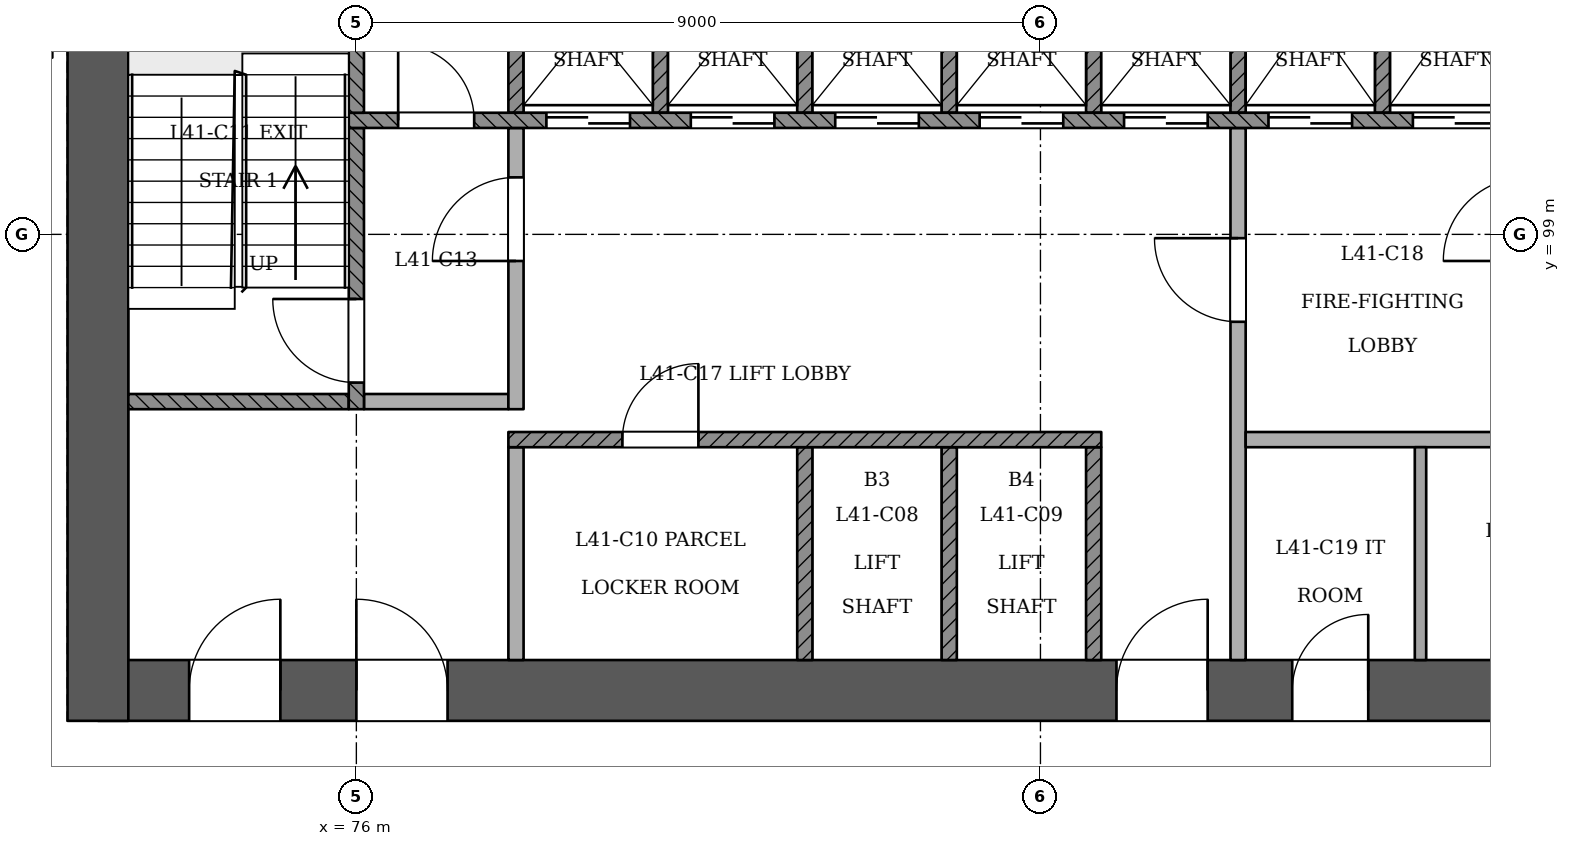
"""IFC4 building model, lengths in metres.
Left out: names, types, materials, properties, quantities, classifications, styles, units other than length and angle.
Written with IfcOpenShell. Run it as: python <this file> out.ifc"""

import sys

from ifc_helpers import new_model, si_unit, direction, frame, frame_2d, origin, place, context, subcontext, project, spatial, rectangle, extrude, element, fill, save


model = new_model("IFC4")
c1 = context("Model", 3, precision=1e-05, world=origin(), true_north=direction((0.0, 1.0)))
c2 = subcontext(c1, "Body", "Model", "MODEL_VIEW")
j1 = project(units=[si_unit("LENGTHUNIT", "METRE"), si_unit("PLANEANGLEUNIT", "RADIAN")], contexts=[c1])
p1 = place(None, origin())
s1 = spatial("IfcSite", under=j1, at=p1, CompositionType="ELEMENT")
p2 = place(p1, origin())
s2 = spatial("IfcBuilding", under=s1, at=p2, CompositionType="ELEMENT")
p3 = place(p2, frame((0.0, 0.0, 160.2)))
s3 = spatial("IfcBuildingStorey", under=s2, at=p3, CompositionType="ELEMENT", Elevation=160.2)
p4 = place(p3, frame((72.6, 93.0, 0.0), z_axis=(0.0, 0.0, 1.0), x_axis=(1.0, 0.0, 0.0)))
e1 = element("IfcWall", 1, at=p4, inside=s3, PredefinedType="SHEAR", context=c2, shape_type="SweptSolid", body=[
    extrude(rectangle(XDim=25.2, YDim=0.8, at=frame_2d((12.6, 0.0))), origin(), (0.0, 0.0, 1.0), 3.6),
])
p5 = place(p4, frame((1.2, 0.0, 0.0)))
e2 = element("IfcOpeningElement", 2, at=p5, cuts=e1, PredefinedType="OPENING", context=c2, shape_type="SweptSolid", body=[
    extrude(rectangle(XDim=1.2, YDim=2.1, at=frame_2d((0.6, 1.05))), frame((0.0, 0.411, 0.0), z_axis=(0.0, -1.0, 0.0), x_axis=(1.0, 0.0, 0.0)), (0.0, 0.0, 1.0), 0.821),
])
p6 = place(p4, frame((3.4, 0.0, 0.0)))
e3 = element("IfcOpeningElement", 3, at=p6, cuts=e1, PredefinedType="OPENING", context=c2, shape_type="SweptSolid", body=[
    extrude(rectangle(XDim=1.2, YDim=2.1, at=frame_2d((0.6, 1.05))), frame((0.0, 0.411, 0.0), z_axis=(0.0, -1.0, 0.0), x_axis=(1.0, 0.0, 0.0)), (0.0, 0.0, 1.0), 0.821),
])
p7 = place(p4, frame((13.4, 0.0, 0.0)))
e4 = element("IfcOpeningElement", 4, at=p7, cuts=e1, PredefinedType="OPENING", context=c2, shape_type="SweptSolid", body=[
    extrude(rectangle(XDim=1.2, YDim=2.1, at=frame_2d((0.6, 1.05))), frame((0.0, 0.411, 0.0), z_axis=(0.0, -1.0, 0.0), x_axis=(1.0, 0.0, 0.0)), (0.0, 0.0, 1.0), 0.821),
])
p8 = place(p4, frame((15.712, 0.0, 0.0)))
e5 = element("IfcOpeningElement", 5, at=p8, cuts=e1, PredefinedType="OPENING", context=c2, shape_type="SweptSolid", body=[
    extrude(rectangle(XDim=1.0, YDim=2.1, at=frame_2d((0.5, 1.05))), frame((0.0, 0.411, 0.0), z_axis=(0.0, -1.0, 0.0), x_axis=(1.0, 0.0, 0.0)), (0.0, 0.0, 1.0), 0.821),
])
p9 = place(p4, frame((19.15, 0.0, 0.0)))
e6 = element("IfcOpeningElement", 6, at=p9, cuts=e1, PredefinedType="OPENING", context=c2, shape_type="SweptSolid", body=[
    extrude(rectangle(XDim=1.0, YDim=2.1, at=frame_2d((0.5, 1.05))), frame((0.0, 0.411, 0.0), z_axis=(0.0, -1.0, 0.0), x_axis=(1.0, 0.0, 0.0)), (0.0, 0.0, 1.0), 0.821),
])
p10 = place(p4, frame((22.688, 0.0, 0.0)))
e7 = element("IfcOpeningElement", 7, at=p10, cuts=e1, PredefinedType="OPENING", context=c2, shape_type="SweptSolid", body=[
    extrude(rectangle(XDim=1.0, YDim=2.1, at=frame_2d((0.5, 1.05))), frame((0.0, 0.411, 0.0), z_axis=(0.0, -1.0, 0.0), x_axis=(1.0, 0.0, 0.0)), (0.0, 0.0, 1.0), 0.821),
])
p11 = place(p3, frame((72.6, 103.8, 0.0), z_axis=(0.0, 0.0, 1.0), x_axis=(0.0, -1.0, 0.0)))
e8 = element("IfcWall", 8, at=p11, inside=s3, PredefinedType="SHEAR", context=c2, shape_type="SweptSolid", body=[
    extrude(rectangle(XDim=11.2, YDim=0.8, at=frame_2d((5.6, 0.0))), origin(), (0.0, 0.0, 1.0), 3.6),
])
p12 = place(p3, frame((78.1, 93.4, 0.0), z_axis=(0.0, 0.0, 1.0), x_axis=(0.0, 1.0, 0.0)))
e9 = element("IfcWall", 9, at=p12, inside=s3, PredefinedType="PARTITIONING", context=c2, shape_type="SweptSolid", body=[
    extrude(rectangle(XDim=2.8, YDim=0.2, at=frame_2d((1.4, 0.0))), origin(), (0.0, 0.0, 1.0), 3.15),
])
for number, where, z_axis, x_axis in (
    (10, (81.9, 93.4, 0.0), (0.0, 0.0, 1.0), (0.0, 1.0, 0.0)),
    (11, (83.8, 93.4, 0.0), (0.0, 0.0, 1.0), (0.0, 1.0, 0.0)),
    (12, (85.7, 93.4, 0.0), (0.0, 0.0, 1.0), (0.0, 1.0, 0.0)),
):
    element("IfcWall", number, at=place(p3, frame(where, z_axis=z_axis, x_axis=x_axis)), inside=s3, PredefinedType="SOLIDWALL", context=c2, shape_type="SweptSolid", body=[
        extrude(rectangle(XDim=2.8, YDim=0.2, at=frame_2d((1.4, 0.0))), origin(), (0.0, 0.0, 1.0), 3.15),
    ])
p13 = place(p3, frame((87.6, 93.4, 0.0), z_axis=(0.0, 0.0, 1.0), x_axis=(0.0, 1.0, 0.0)))
e13 = element("IfcWall", 13, at=p13, inside=s3, PredefinedType="PARTITIONING", context=c2, shape_type="SweptSolid", body=[
    extrude(rectangle(XDim=7.0, YDim=0.2, at=frame_2d((3.5, 0.0))), origin(), (0.0, 0.0, 1.0), 3.15),
])
p14 = place(p13, frame((4.45, 0.0, 0.0)))
e14 = element("IfcOpeningElement", 14, at=p14, cuts=e13, PredefinedType="OPENING", context=c2, shape_type="SweptSolid", body=[
    extrude(rectangle(XDim=1.1, YDim=2.1, at=frame_2d((0.55, 1.05))), frame((0.0, 0.11, 0.0), z_axis=(0.0, -1.0, 0.0), x_axis=(1.0, 0.0, 0.0)), (0.0, 0.0, 1.0), 0.221),
])
p15 = place(p3, frame((90.0, 93.4, 0.0), z_axis=(0.0, 0.0, 1.0), x_axis=(0.0, 1.0, 0.0)))
e15 = element("IfcWall", 15, at=p15, inside=s3, PredefinedType="PARTITIONING", context=c2, shape_type="SweptSolid", body=[
    extrude(rectangle(XDim=2.8, YDim=0.15, at=frame_2d((1.4, 0.0))), origin(), (0.0, 0.0, 1.0), 3.15),
])
p16 = place(p3, frame((78.0, 96.3, 0.0), z_axis=(0.0, 0.0, 1.0), x_axis=(1.0, 0.0, 0.0)))
e16 = element("IfcWall", 16, at=p16, inside=s3, PredefinedType="SOLIDWALL", context=c2, shape_type="SweptSolid", body=[
    extrude(rectangle(XDim=7.8, YDim=0.2, at=frame_2d((3.9, 0.0))), origin(), (0.0, 0.0, 1.0), 3.15),
])
p17 = place(p16, frame((1.5, 0.0, 0.0)))
e17 = element("IfcOpeningElement", 17, at=p17, cuts=e16, PredefinedType="OPENING", context=c2, shape_type="SweptSolid", body=[
    extrude(rectangle(XDim=1.0, YDim=2.1, at=frame_2d((0.5, 1.05))), frame((0.0, 0.11, 0.0), z_axis=(0.0, -1.0, 0.0), x_axis=(1.0, 0.0, 0.0)), (0.0, 0.0, 1.0), 0.221),
])
p18 = place(p3, frame((87.7, 96.3, 0.0), z_axis=(0.0, 0.0, 1.0), x_axis=(1.0, 0.0, 0.0)))
e18 = element("IfcWall", 18, at=p18, inside=s3, PredefinedType="PARTITIONING", context=c2, shape_type="SweptSolid", body=[
    extrude(rectangle(XDim=3.6, YDim=0.2, at=frame_2d((1.8, 0.0))), origin(), (0.0, 0.0, 1.0), 3.15),
])
p19 = place(p3, frame((73.0, 96.8, 0.0), z_axis=(0.0, 0.0, 1.0), x_axis=(1.0, 0.0, 0.0)))
e19 = element("IfcWall", 19, at=p19, inside=s3, PredefinedType="SOLIDWALL", context=c2, shape_type="SweptSolid", body=[
    extrude(rectangle(XDim=2.9, YDim=0.2, at=frame_2d((1.45, 0.0))), origin(), (0.0, 0.0, 1.0), 3.15),
])
p20 = place(p3, frame((76.0, 96.7, 0.0), z_axis=(0.0, 0.0, 1.0), x_axis=(0.0, 1.0, 0.0)))
e20 = element("IfcWall", 20, at=p20, inside=s3, PredefinedType="SOLIDWALL", context=c2, shape_type="SweptSolid", body=[
    extrude(rectangle(XDim=3.7, YDim=0.2, at=frame_2d((1.85, 0.0))), origin(), (0.0, 0.0, 1.0), 3.15),
])
p21 = place(p20, frame((0.35, 0.0, 0.0)))
e21 = element("IfcOpeningElement", 21, at=p21, cuts=e20, PredefinedType="OPENING", context=c2, shape_type="SweptSolid", body=[
    extrude(rectangle(XDim=1.1, YDim=2.1, at=frame_2d((0.55, 1.05))), frame((0.0, 0.11, 0.0), z_axis=(0.0, -1.0, 0.0), x_axis=(1.0, 0.0, 0.0)), (0.0, 0.0, 1.0), 0.221),
])
p22 = place(p3, frame((76.1, 96.8, 0.0), z_axis=(0.0, 0.0, 1.0), x_axis=(1.0, 0.0, 0.0)))
e22 = element("IfcWall", 22, at=p22, inside=s3, PredefinedType="PARTITIONING", context=c2, shape_type="SweptSolid", body=[
    extrude(rectangle(XDim=1.9, YDim=0.2, at=frame_2d((0.95, 0.0))), origin(), (0.0, 0.0, 1.0), 3.15),
])
p23 = place(p3, frame((78.1, 96.7, 0.0), z_axis=(0.0, 0.0, 1.0), x_axis=(0.0, 1.0, 0.0)))
e23 = element("IfcWall", 23, at=p23, inside=s3, PredefinedType="PARTITIONING", context=c2, shape_type="SweptSolid", body=[
    extrude(rectangle(XDim=3.7, YDim=0.2, at=frame_2d((1.85, 0.0))), origin(), (0.0, 0.0, 1.0), 3.15),
])
p24 = place(p23, frame((1.95, 0.0, 0.0)))
e24 = element("IfcOpeningElement", 24, at=p24, cuts=e23, PredefinedType="OPENING", context=c2, shape_type="SweptSolid", body=[
    extrude(rectangle(XDim=1.1, YDim=2.1, at=frame_2d((0.55, 1.05))), frame((0.0, 0.11, 0.0), z_axis=(0.0, -1.0, 0.0), x_axis=(1.0, 0.0, 0.0)), (0.0, 0.0, 1.0), 0.221),
])
p25 = place(p3, frame((75.9, 100.5, 0.0), z_axis=(0.0, 0.0, 1.0), x_axis=(1.0, 0.0, 0.0)))
e25 = element("IfcWall", 25, at=p25, inside=s3, PredefinedType="SOLIDWALL", context=c2, shape_type="SweptSolid", body=[
    extrude(rectangle(XDim=18.2, YDim=0.2, at=frame_2d((9.1, 0.0))), origin(), (0.0, 0.0, 1.0), 3.15),
])
p26 = place(p25, frame((2.6, 0.0, 0.0)))
e26 = element("IfcOpeningElement", 26, at=p26, cuts=e25, PredefinedType="OPENING", context=c2, shape_type="SweptSolid", body=[
    extrude(rectangle(XDim=1.1, YDim=2.1, at=frame_2d((0.55, 1.05))), frame((0.0, 0.11, 0.0), z_axis=(0.0, -1.0, 0.0), x_axis=(1.0, 0.0, 0.0)), (0.0, 0.0, 1.0), 0.221),
])
p27 = place(p25, frame((4.5, 0.0, 0.0)))
e27 = element("IfcOpeningElement", 27, at=p27, cuts=e25, PredefinedType="OPENING", context=c2, shape_type="SweptSolid", body=[
    extrude(rectangle(XDim=1.1, YDim=2.1, at=frame_2d((0.55, 1.05))), frame((0.0, 0.11, 0.0), z_axis=(0.0, -1.0, 0.0), x_axis=(1.0, 0.0, 0.0)), (0.0, 0.0, 1.0), 0.221),
])
p28 = place(p25, frame((6.4, 0.0, 0.0)))
e28 = element("IfcOpeningElement", 28, at=p28, cuts=e25, PredefinedType="OPENING", context=c2, shape_type="SweptSolid", body=[
    extrude(rectangle(XDim=1.1, YDim=2.1, at=frame_2d((0.55, 1.05))), frame((0.0, 0.11, 0.0), z_axis=(0.0, -1.0, 0.0), x_axis=(1.0, 0.0, 0.0)), (0.0, 0.0, 1.0), 0.221),
])
p29 = place(p25, frame((8.3, 0.0, 0.0)))
e29 = element("IfcOpeningElement", 29, at=p29, cuts=e25, PredefinedType="OPENING", context=c2, shape_type="SweptSolid", body=[
    extrude(rectangle(XDim=1.1, YDim=2.1, at=frame_2d((0.55, 1.05))), frame((0.0, 0.11, 0.0), z_axis=(0.0, -1.0, 0.0), x_axis=(1.0, 0.0, 0.0)), (0.0, 0.0, 1.0), 0.221),
])
p30 = place(p25, frame((10.2, 0.0, 0.0)))
e30 = element("IfcOpeningElement", 30, at=p30, cuts=e25, PredefinedType="OPENING", context=c2, shape_type="SweptSolid", body=[
    extrude(rectangle(XDim=1.1, YDim=2.1, at=frame_2d((0.55, 1.05))), frame((0.0, 0.11, 0.0), z_axis=(0.0, -1.0, 0.0), x_axis=(1.0, 0.0, 0.0)), (0.0, 0.0, 1.0), 0.221),
])
p31 = place(p25, frame((12.1, 0.0, 0.0)))
e31 = element("IfcOpeningElement", 31, at=p31, cuts=e25, PredefinedType="OPENING", context=c2, shape_type="SweptSolid", body=[
    extrude(rectangle(XDim=1.1, YDim=2.1, at=frame_2d((0.55, 1.05))), frame((0.0, 0.11, 0.0), z_axis=(0.0, -1.0, 0.0), x_axis=(1.0, 0.0, 0.0)), (0.0, 0.0, 1.0), 0.221),
])
p32 = place(p25, frame((14.0, 0.0, 0.0)))
e32 = element("IfcOpeningElement", 32, at=p32, cuts=e25, PredefinedType="OPENING", context=c2, shape_type="SweptSolid", body=[
    extrude(rectangle(XDim=1.1, YDim=2.1, at=frame_2d((0.55, 1.05))), frame((0.0, 0.11, 0.0), z_axis=(0.0, -1.0, 0.0), x_axis=(1.0, 0.0, 0.0)), (0.0, 0.0, 1.0), 0.221),
])
p33 = place(p25, frame((0.65, 0.0, 0.0)))
e33 = element("IfcOpeningElement", 33, at=p33, cuts=e25, PredefinedType="OPENING", context=c2, shape_type="SweptSolid", body=[
    extrude(rectangle(XDim=1.0, YDim=2.1, at=frame_2d((0.5, 1.05))), frame((0.0, 0.11, 0.0), z_axis=(0.0, -1.0, 0.0), x_axis=(1.0, 0.0, 0.0)), (0.0, 0.0, 1.0), 0.221),
])
p34 = place(p25, frame((16.3, 0.0, 0.0)))
e34 = element("IfcOpeningElement", 34, at=p34, cuts=e25, PredefinedType="OPENING", context=c2, shape_type="SweptSolid", body=[
    extrude(rectangle(XDim=1.0, YDim=2.1, at=frame_2d((0.5, 1.05))), frame((0.0, 0.11, 0.0), z_axis=(0.0, -1.0, 0.0), x_axis=(1.0, 0.0, 0.0)), (0.0, 0.0, 1.0), 0.221),
])
for number, where, z_axis, x_axis in (
    (35, (76.0, 100.6, 0.0), (0.0, 0.0, 1.0), (0.0, 1.0, 0.0)),
    (36, (78.1, 100.6, 0.0), (0.0, 0.0, 1.0), (0.0, 1.0, 0.0)),
    (37, (80.0, 100.6, 0.0), (0.0, 0.0, 1.0), (0.0, 1.0, 0.0)),
    (38, (81.9, 100.6, 0.0), (0.0, 0.0, 1.0), (0.0, 1.0, 0.0)),
    (39, (83.8, 100.6, 0.0), (0.0, 0.0, 1.0), (0.0, 1.0, 0.0)),
    (40, (85.7, 100.6, 0.0), (0.0, 0.0, 1.0), (0.0, 1.0, 0.0)),
    (41, (87.6, 100.6, 0.0), (0.0, 0.0, 1.0), (0.0, 1.0, 0.0)),
    (42, (89.5, 100.6, 0.0), (0.0, 0.0, 1.0), (0.0, 1.0, 0.0)),
):
    element("IfcWall", number, at=place(p3, frame(where, z_axis=z_axis, x_axis=x_axis)), inside=s3, PredefinedType="SOLIDWALL", context=c2, shape_type="SweptSolid", body=[
        extrude(rectangle(XDim=2.8, YDim=0.2, at=frame_2d((1.4, 0.0))), origin(), (0.0, 0.0, 1.0), 3.15),
    ])
p35 = place(p26, origin())
e43 = element("IfcDoor", 43, at=p35, inside=s3, OperationType="SLIDING_TO_RIGHT", PredefinedType="NOTDEFINED", context=c2, shape_type="SweptSolid", body=[
    extrude(rectangle(XDim=1.1, YDim=2.1, at=frame_2d((0.55, 1.05))), frame((0.0, 0.025, 0.0), z_axis=(0.0, -1.0, 0.0), x_axis=(1.0, 0.0, 0.0)), (0.0, 0.0, 1.0), 0.05),
])
fill(e26, e43)
p36 = place(p27, origin())
e44 = element("IfcDoor", 44, at=p36, inside=s3, OperationType="SLIDING_TO_LEFT", PredefinedType="NOTDEFINED", context=c2, shape_type="SweptSolid", body=[
    extrude(rectangle(XDim=1.1, YDim=2.1, at=frame_2d((0.55, 1.05))), frame((0.0, 0.025, 0.0), z_axis=(0.0, -1.0, 0.0), x_axis=(1.0, 0.0, 0.0)), (0.0, 0.0, 1.0), 0.05),
])
fill(e27, e44)
p37 = place(p28, origin())
e45 = element("IfcDoor", 45, at=p37, inside=s3, OperationType="SLIDING_TO_RIGHT", PredefinedType="NOTDEFINED", context=c2, shape_type="SweptSolid", body=[
    extrude(rectangle(XDim=1.1, YDim=2.1, at=frame_2d((0.55, 1.05))), frame((0.0, 0.025, 0.0), z_axis=(0.0, -1.0, 0.0), x_axis=(1.0, 0.0, 0.0)), (0.0, 0.0, 1.0), 0.05),
])
fill(e28, e45)
p38 = place(p29, origin())
e46 = element("IfcDoor", 46, at=p38, inside=s3, OperationType="SLIDING_TO_LEFT", PredefinedType="NOTDEFINED", context=c2, shape_type="SweptSolid", body=[
    extrude(rectangle(XDim=1.1, YDim=2.1, at=frame_2d((0.55, 1.05))), frame((0.0, 0.025, 0.0), z_axis=(0.0, -1.0, 0.0), x_axis=(1.0, 0.0, 0.0)), (0.0, 0.0, 1.0), 0.05),
])
fill(e29, e46)
p39 = place(p30, origin())
e47 = element("IfcDoor", 47, at=p39, inside=s3, OperationType="SLIDING_TO_RIGHT", PredefinedType="NOTDEFINED", context=c2, shape_type="SweptSolid", body=[
    extrude(rectangle(XDim=1.1, YDim=2.1, at=frame_2d((0.55, 1.05))), frame((0.0, 0.025, 0.0), z_axis=(0.0, -1.0, 0.0), x_axis=(1.0, 0.0, 0.0)), (0.0, 0.0, 1.0), 0.05),
])
fill(e30, e47)
p40 = place(p31, origin())
e48 = element("IfcDoor", 48, at=p40, inside=s3, OperationType="SLIDING_TO_RIGHT", PredefinedType="NOTDEFINED", context=c2, shape_type="SweptSolid", body=[
    extrude(rectangle(XDim=1.1, YDim=2.1, at=frame_2d((0.55, 1.05))), frame((0.0, 0.025, 0.0), z_axis=(0.0, -1.0, 0.0), x_axis=(1.0, 0.0, 0.0)), (0.0, 0.0, 1.0), 0.05),
])
fill(e31, e48)
p41 = place(p32, origin())
e49 = element("IfcDoor", 49, at=p41, inside=s3, OperationType="SLIDING_TO_LEFT", PredefinedType="NOTDEFINED", context=c2, shape_type="SweptSolid", body=[
    extrude(rectangle(XDim=1.1, YDim=2.1, at=frame_2d((0.55, 1.05))), frame((0.0, 0.025, 0.0), z_axis=(0.0, -1.0, 0.0), x_axis=(1.0, 0.0, 0.0)), (0.0, 0.0, 1.0), 0.05),
])
fill(e32, e49)
p42 = place(p21, origin())
e50 = element("IfcDoor", 50, at=p42, inside=s3, OperationType="SINGLE_SWING_RIGHT", PredefinedType="NOTDEFINED", context=c2, shape_type="SweptSolid", body=[
    extrude(rectangle(XDim=1.1, YDim=2.1, at=frame_2d((0.55, 1.05))), frame((0.0, 0.025, 0.0), z_axis=(0.0, -1.0, 0.0), x_axis=(1.0, 0.0, 0.0)), (0.0, 0.0, 1.0), 0.05),
])
fill(e21, e50)
p43 = place(p24, origin())
e51 = element("IfcDoor", 51, at=p43, inside=s3, OperationType="SINGLE_SWING_LEFT", PredefinedType="NOTDEFINED", context=c2, shape_type="SweptSolid", body=[
    extrude(rectangle(XDim=1.1, YDim=2.1, at=frame_2d((0.55, 1.05))), frame((0.0, 0.025, 0.0), z_axis=(0.0, -1.0, 0.0), x_axis=(1.0, 0.0, 0.0)), (0.0, 0.0, 1.0), 0.05),
])
fill(e24, e51)
p44 = place(p14, origin())
e52 = element("IfcDoor", 52, at=p44, inside=s3, OperationType="SINGLE_SWING_RIGHT", PredefinedType="NOTDEFINED", context=c2, shape_type="SweptSolid", body=[
    extrude(rectangle(XDim=1.1, YDim=2.1, at=frame_2d((0.55, 1.05))), frame((0.0, 0.025, 0.0), z_axis=(0.0, -1.0, 0.0), x_axis=(1.0, 0.0, 0.0)), (0.0, 0.0, 1.0), 0.05),
])
fill(e14, e52)
p45 = place(p5, origin())
e53 = element("IfcDoor", 53, at=p45, inside=s3, OperationType="SINGLE_SWING_RIGHT", PredefinedType="NOTDEFINED", context=c2, shape_type="SweptSolid", body=[
    extrude(rectangle(XDim=1.2, YDim=2.1, at=frame_2d((0.6, 1.05))), frame((0.0, 0.025, 0.0), z_axis=(0.0, -1.0, 0.0), x_axis=(1.0, 0.0, 0.0)), (0.0, 0.0, 1.0), 0.05),
])
fill(e2, e53)
p46 = place(p6, origin())
e54 = element("IfcDoor", 54, at=p46, inside=s3, OperationType="SINGLE_SWING_LEFT", PredefinedType="NOTDEFINED", context=c2, shape_type="SweptSolid", body=[
    extrude(rectangle(XDim=1.2, YDim=2.1, at=frame_2d((0.6, 1.05))), frame((0.0, 0.025, 0.0), z_axis=(0.0, -1.0, 0.0), x_axis=(1.0, 0.0, 0.0)), (0.0, 0.0, 1.0), 0.05),
])
fill(e3, e54)
p47 = place(p7, origin())
e55 = element("IfcDoor", 55, at=p47, inside=s3, OperationType="SINGLE_SWING_RIGHT", PredefinedType="NOTDEFINED", context=c2, shape_type="SweptSolid", body=[
    extrude(rectangle(XDim=1.2, YDim=2.1, at=frame_2d((0.6, 1.05))), frame((0.0, 0.025, 0.0), z_axis=(0.0, -1.0, 0.0), x_axis=(1.0, 0.0, 0.0)), (0.0, 0.0, 1.0), 0.05),
])
fill(e4, e55)
p48 = place(p33, origin())
e56 = element("IfcDoor", 56, at=p48, inside=s3, OperationType="SINGLE_SWING_LEFT", PredefinedType="NOTDEFINED", context=c2, shape_type="SweptSolid", body=[
    extrude(rectangle(XDim=1.0, YDim=2.1, at=frame_2d((0.5, 1.05))), frame((0.0, 0.025, 0.0), z_axis=(0.0, -1.0, 0.0), x_axis=(1.0, 0.0, 0.0)), (0.0, 0.0, 1.0), 0.05),
])
fill(e33, e56)
p49 = place(p8, origin())
e57 = element("IfcDoor", 57, at=p49, inside=s3, OperationType="SINGLE_SWING_RIGHT", PredefinedType="NOTDEFINED", context=c2, shape_type="SweptSolid", body=[
    extrude(rectangle(XDim=1.0, YDim=2.1, at=frame_2d((0.5, 1.05))), frame((0.0, 0.025, 0.0), z_axis=(0.0, -1.0, 0.0), x_axis=(1.0, 0.0, 0.0)), (0.0, 0.0, 1.0), 0.05),
])
fill(e5, e57)
p50 = place(p17, origin())
e58 = element("IfcDoor", 58, at=p50, inside=s3, OperationType="SINGLE_SWING_RIGHT", PredefinedType="NOTDEFINED", context=c2, shape_type="SweptSolid", body=[
    extrude(rectangle(XDim=1.0, YDim=2.1, at=frame_2d((0.5, 1.05))), frame((0.0, 0.025, 0.0), z_axis=(0.0, -1.0, 0.0), x_axis=(1.0, 0.0, 0.0)), (0.0, 0.0, 1.0), 0.05),
])
fill(e17, e58)
save(model, sys.argv[1])
